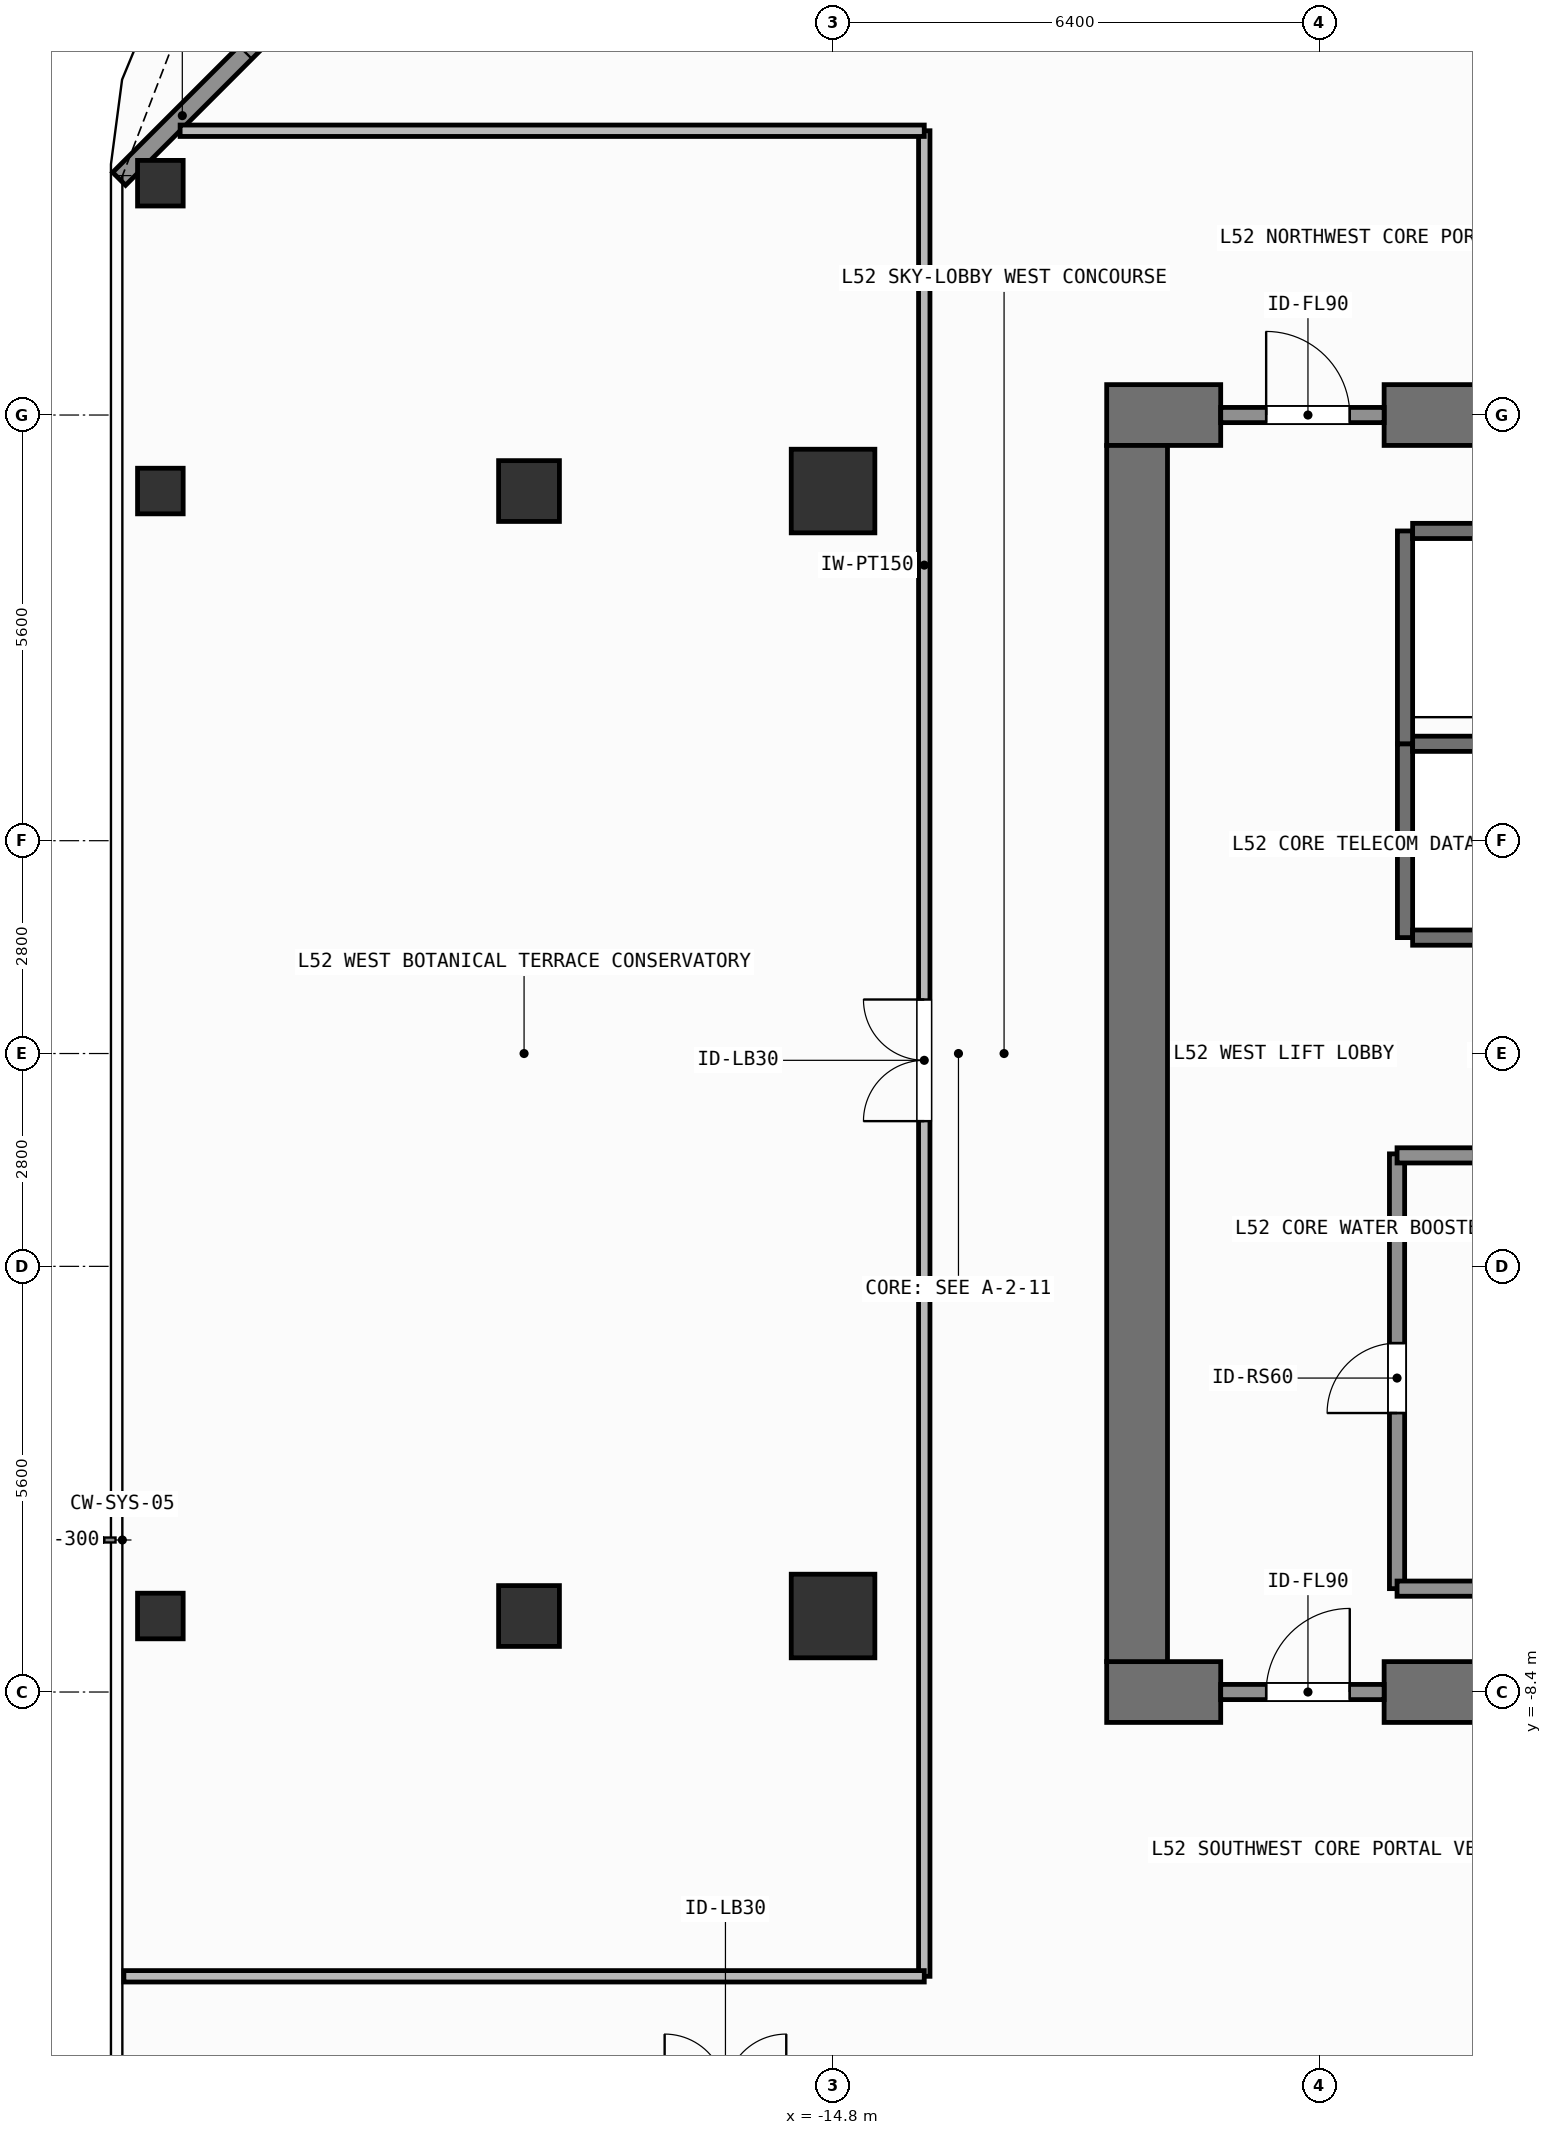
"""IFC4 building model, lengths in metres.
Left out: names, types, materials, properties, quantities, classifications, styles, units other than length and angle.
Written with IfcOpenShell. Run it as: python <this file> out.ifc"""

import sys

from ifc_helpers import new_model, si_unit, direction, frame, frame_2d, origin, origin_2d, place, context, subcontext, project, spatial, rectangle, hollow_rectangle, extrude, element, fill, save


model = new_model("IFC4")
c1 = context("Model", 3, precision=1e-05, world=origin(), true_north=direction((0.0, 1.0)))
c2 = subcontext(c1, "Body", "Model", "MODEL_VIEW")
j1 = project(units=[si_unit("LENGTHUNIT", "METRE"), si_unit("PLANEANGLEUNIT", "RADIAN")], contexts=[c1])
p1 = place(None, origin())
s1 = spatial("IfcSite", under=j1, at=p1, CompositionType="ELEMENT")
p2 = place(p1, origin())
s2 = spatial("IfcBuilding", under=s1, at=p2, CompositionType="ELEMENT")
p3 = place(p2, frame((0.0, 0.0, 210.9)))
s3 = spatial("IfcBuildingStorey", under=s2, at=p3, CompositionType="ELEMENT", Elevation=210.9)
p4 = place(p3, frame((-11.2, -8.4, 0.0), z_axis=(0.0, 0.0, 1.0), x_axis=(1.0, 0.0, 0.0)))
e1 = element("IfcWall", 1, at=p4, inside=s3, PredefinedType="SHEAR", context=c2, shape_type="SweptSolid", body=[
    extrude(rectangle(XDim=1.5, YDim=0.8, at=frame_2d((0.75, 0.0))), origin(), (0.0, 0.0, 1.0), 4.8),
])
p5 = place(p3, frame((-7.55, -8.4, 0.0), z_axis=(0.0, 0.0, 1.0), x_axis=(1.0, 0.0, 0.0)))
e2 = element("IfcWall", 2, at=p5, inside=s3, PredefinedType="SHEAR", context=c2, shape_type="SweptSolid", body=[
    extrude(rectangle(XDim=3.35, YDim=0.8, at=frame_2d((1.675, 0.0))), origin(), (0.0, 0.0, 1.0), 4.8),
])
p6 = place(p3, frame((-11.2, 8.4, 0.0), z_axis=(0.0, 0.0, 1.0), x_axis=(1.0, 0.0, 0.0)))
e3 = element("IfcWall", 3, at=p6, inside=s3, PredefinedType="SHEAR", context=c2, shape_type="SweptSolid", body=[
    extrude(rectangle(XDim=1.5, YDim=0.8, at=frame_2d((0.75, 0.0))), origin(), (0.0, 0.0, 1.0), 4.8),
])
p7 = place(p3, frame((-7.55, 8.4, 0.0), z_axis=(0.0, 0.0, 1.0), x_axis=(1.0, 0.0, 0.0)))
e4 = element("IfcWall", 4, at=p7, inside=s3, PredefinedType="SHEAR", context=c2, shape_type="SweptSolid", body=[
    extrude(rectangle(XDim=16.35, YDim=0.8, at=frame_2d((8.175, 0.0))), origin(), (0.0, 0.0, 1.0), 4.8),
])
p8 = place(p3, frame((-10.8, -8.0, 0.0), z_axis=(0.0, 0.0, 1.0), x_axis=(0.0, 1.0, 0.0)))
e5 = element("IfcWall", 5, at=p8, inside=s3, PredefinedType="SHEAR", context=c2, shape_type="SweptSolid", body=[
    extrude(rectangle(XDim=16.0, YDim=0.8, at=frame_2d((8.0, 0.0))), origin(), (0.0, 0.0, 1.0), 4.8),
])
for number, where, z_axis, x_axis in (
    (6, (-14.8, -7.4, 0.0), (0.0, 0.0, 1.0), (1.0, 0.0, 0.0)),
    (7, (-14.8, 7.4, 0.0), (0.0, 0.0, 1.0), (1.0, 0.0, 0.0)),
):
    element("IfcColumn", number, at=place(p3, frame(where, z_axis=z_axis, x_axis=x_axis)), inside=s3, PredefinedType="COLUMN", context=c2, shape_type="SweptSolid", body=[
        extrude(rectangle(XDim=1.1, YDim=1.1, at=origin_2d()), origin(), (0.0, 0.0, 1.0), 4.8),
    ])
for number, where, z_axis, x_axis in (
    (8, (-18.8, -7.4, 0.0), (0.0, 0.0, 1.0), (1.0, 0.0, 0.0)),
    (9, (-18.8, 7.4, 0.0), (0.0, 0.0, 1.0), (1.0, 0.0, 0.0)),
):
    element("IfcColumn", number, at=place(p3, frame(where, z_axis=z_axis, x_axis=x_axis)), inside=s3, PredefinedType="COLUMN", context=c2, shape_type="SweptSolid", body=[
        extrude(hollow_rectangle(XDim=0.8, YDim=0.8, WallThickness=0.036, at=origin_2d()), origin(), (0.0, 0.0, 1.0), 4.8),
    ])
for number, where, z_axis, x_axis in (
    (10, (-23.65, 11.45, 0.0), (0.0, 0.0, 1.0), (1.0, 0.0, 0.0)),
    (11, (-23.65, -7.4, 0.0), (0.0, 0.0, 1.0), (1.0, 0.0, 0.0)),
    (12, (-23.65, 7.4, 0.0), (0.0, 0.0, 1.0), (1.0, 0.0, 0.0)),
):
    element("IfcColumn", number, at=place(p3, frame(where, z_axis=z_axis, x_axis=x_axis)), inside=s3, PredefinedType="COLUMN", context=c2, shape_type="SweptSolid", body=[
        extrude(hollow_rectangle(XDim=0.6, YDim=0.6, WallThickness=0.028, at=origin_2d()), origin(), (0.0, 0.0, 1.0), 4.8),
    ])
p9 = place(p3, frame((-24.192, 11.508, 0.0), z_axis=(0.0, 0.0, 1.0), x_axis=(0.707106781187, 0.707106781187, 0.0)))
e13 = element("IfcWall", 13, at=p9, inside=s3, PredefinedType="SOLIDWALL", context=c2, shape_type="SweptSolid", body=[
    extrude(rectangle(XDim=6.201, YDim=0.24, at=frame_2d((3.101, 0.0))), origin(), (0.0, 0.0, 1.0), 4.58),
])
p10 = place(p9, frame((2.351, 0.0, 0.8)))
e14 = element("IfcOpeningElement", 14, at=p10, cuts=e13, PredefinedType="OPENING", context=c2, shape_type="SweptSolid", body=[
    extrude(rectangle(XDim=1.5, YDim=1.85, at=frame_2d((0.75, 0.925))), frame((0.0, 0.13, 0.0), z_axis=(0.0, -1.0, 0.0), x_axis=(1.0, 0.0, 0.0)), (0.0, 0.0, 1.0), 0.26),
])
p11 = place(p3, frame((-7.275, 1.525, 0.0), z_axis=(0.0, 0.0, 1.0), x_axis=(0.0, 1.0, 0.0)))
e15 = element("IfcWall", 15, at=p11, inside=s3, PredefinedType="SHEAR", context=c2, shape_type="SweptSolid", body=[
    extrude(rectangle(XDim=2.55, YDim=0.2, at=frame_2d((1.275, 0.0))), origin(), (0.0, 0.0, 1.0), 4.58),
])
for number, where, z_axis, x_axis in (
    (16, (-7.175, 1.525, 0.0), (0.0, 0.0, 1.0), (1.0, 0.0, 0.0)),
    (17, (-7.175, 4.075, 0.0), (0.0, 0.0, 1.0), (1.0, 0.0, 0.0)),
):
    element("IfcWall", number, at=place(p3, frame(where, z_axis=z_axis, x_axis=x_axis)), inside=s3, PredefinedType="SHEAR", context=c2, shape_type="SweptSolid", body=[
        extrude(rectangle(XDim=2.35, YDim=0.2, at=frame_2d((1.175, 0.0))), origin(), (0.0, 0.0, 1.0), 4.58),
    ])
p12 = place(p3, frame((-7.275, 4.075, 0.0), z_axis=(0.0, 0.0, 1.0), x_axis=(0.0, 1.0, 0.0)))
e18 = element("IfcWall", 18, at=p12, inside=s3, PredefinedType="SHEAR", context=c2, shape_type="SweptSolid", body=[
    extrude(rectangle(XDim=2.8, YDim=0.2, at=frame_2d((1.4, 0.0))), origin(), (0.0, 0.0, 1.0), 4.58),
])
p13 = place(p3, frame((-7.175, 6.875, 0.0), z_axis=(0.0, 0.0, 1.0), x_axis=(1.0, 0.0, 0.0)))
e19 = element("IfcWall", 19, at=p13, inside=s3, PredefinedType="SHEAR", context=c2, shape_type="SweptSolid", body=[
    extrude(rectangle(XDim=2.35, YDim=0.2, at=frame_2d((1.175, 0.0))), origin(), (0.0, 0.0, 1.0), 4.58),
])
p14 = place(p3, frame((-9.7, -8.4, 0.0), z_axis=(0.0, 0.0, 1.0), x_axis=(1.0, 0.0, 0.0)))
e20 = element("IfcWall", 20, at=p14, inside=s3, PredefinedType="SOLIDWALL", context=c2, shape_type="SweptSolid", body=[
    extrude(rectangle(XDim=2.15, YDim=0.2, at=frame_2d((1.075, 0.0))), origin(), (0.0, 0.0, 1.0), 3.72),
])
p15 = place(p14, frame((0.598, 0.0, 0.0)))
e21 = element("IfcOpeningElement", 21, at=p15, cuts=e20, PredefinedType="OPENING", context=c2, shape_type="SweptSolid", body=[
    extrude(rectangle(XDim=1.1, YDim=2.15, at=frame_2d((0.55, 1.075))), frame((0.0, 0.11, 0.0), z_axis=(0.0, -1.0, 0.0), x_axis=(1.0, 0.0, 0.0)), (0.0, 0.0, 1.0), 0.22),
])
p16 = place(p3, frame((-9.7, 8.4, 0.0), z_axis=(0.0, 0.0, 1.0), x_axis=(1.0, 0.0, 0.0)))
e22 = element("IfcWall", 22, at=p16, inside=s3, PredefinedType="SOLIDWALL", context=c2, shape_type="SweptSolid", body=[
    extrude(rectangle(XDim=2.15, YDim=0.2, at=frame_2d((1.075, 0.0))), origin(), (0.0, 0.0, 1.0), 3.72),
])
p17 = place(p16, frame((0.598, 0.0, 0.0)))
e23 = element("IfcOpeningElement", 23, at=p17, cuts=e22, PredefinedType="OPENING", context=c2, shape_type="SweptSolid", body=[
    extrude(rectangle(XDim=1.1, YDim=2.15, at=frame_2d((0.55, 1.075))), frame((0.0, 0.11, 0.0), z_axis=(0.0, -1.0, 0.0), x_axis=(1.0, 0.0, 0.0)), (0.0, 0.0, 1.0), 0.22),
])
p18 = place(p3, frame((-7.38, -7.04, 0.0), z_axis=(0.0, 0.0, 1.0), x_axis=(0.0, 1.0, 0.0)))
e24 = element("IfcWall", 24, at=p18, inside=s3, PredefinedType="SOLIDWALL", context=c2, shape_type="SweptSolid", body=[
    extrude(rectangle(XDim=5.72, YDim=0.2, at=frame_2d((2.86, 0.0))), origin(), (0.0, 0.0, 1.0), 4.58),
])
p19 = place(p18, frame((2.31, 0.0, 0.0)))
e25 = element("IfcOpeningElement", 25, at=p19, cuts=e24, PredefinedType="OPENING", context=c2, shape_type="SweptSolid", body=[
    extrude(rectangle(XDim=0.92, YDim=2.1, at=frame_2d((0.46, 1.05))), frame((0.0, 0.11, 0.0), z_axis=(0.0, -1.0, 0.0), x_axis=(1.0, 0.0, 0.0)), (0.0, 0.0, 1.0), 0.22),
])
p20 = place(p3, frame((-13.6, -12.14, 0.0), z_axis=(0.0, 0.0, 1.0), x_axis=(0.0, 1.0, 0.0)))
e26 = element("IfcWall", 26, at=p20, inside=s3, PredefinedType="PARTITIONING", context=c2, shape_type="SweptSolid", body=[
    extrude(rectangle(XDim=24.28, YDim=0.15, at=frame_2d((12.14, 0.0))), origin(), (0.0, 0.0, 1.0), 4.58),
])
p21 = place(p20, frame((11.25, 0.0, 0.0)))
e27 = element("IfcOpeningElement", 27, at=p21, cuts=e26, PredefinedType="OPENING", context=c2, shape_type="SweptSolid", body=[
    extrude(rectangle(XDim=1.6, YDim=2.3, at=frame_2d((0.8, 1.15))), frame((0.0, 0.085, 0.0), z_axis=(0.0, -1.0, 0.0), x_axis=(1.0, 0.0, 0.0)), (0.0, 0.0, 1.0), 0.17),
])
p22 = place(p3, frame((-7.38, -1.34, 0.0), z_axis=(0.0, 0.0, 1.0), x_axis=(1.0, 0.0, 0.0)))
e28 = element("IfcWall", 28, at=p22, inside=s3, PredefinedType="SOLIDWALL", context=c2, shape_type="SweptSolid", body=[
    extrude(rectangle(XDim=2.91, YDim=0.2, at=frame_2d((1.455, 0.0))), origin(), (0.0, 0.0, 1.0), 4.58),
])
p23 = place(p3, frame((-7.38, -7.04, 0.0), z_axis=(0.0, 0.0, 1.0), x_axis=(1.0, 0.0, 0.0)))
e29 = element("IfcWall", 29, at=p23, inside=s3, PredefinedType="SOLIDWALL", context=c2, shape_type="SweptSolid", body=[
    extrude(rectangle(XDim=2.8, YDim=0.2, at=frame_2d((1.4, 0.0))), origin(), (0.0, 0.0, 1.0), 4.58),
])
p24 = place(p3, frame((-24.13, -12.14, 0.0), z_axis=(0.0, 0.0, 1.0), x_axis=(1.0, 0.0, 0.0)))
e30 = element("IfcWall", 30, at=p24, inside=s3, PredefinedType="PARTITIONING", context=c2, shape_type="SweptSolid", body=[
    extrude(rectangle(XDim=10.53, YDim=0.15, at=frame_2d((5.265, 0.0))), origin(), (0.0, 0.0, 1.0), 4.58),
])
p25 = place(p3, frame((-23.39, 12.14, 0.0), z_axis=(0.0, 0.0, 1.0), x_axis=(1.0, 0.0, 0.0)))
e31 = element("IfcWall", 31, at=p25, inside=s3, PredefinedType="PARTITIONING", context=c2, shape_type="SweptSolid", body=[
    extrude(rectangle(XDim=9.79, YDim=0.15, at=frame_2d((4.895, 0.0))), origin(), (0.0, 0.0, 1.0), 4.58),
])
p26 = place(p10, origin())
e32 = element("IfcWindow", 32, at=p26, inside=s3, PartitioningType="SINGLE_PANEL", PredefinedType="WINDOW", context=c2, shape_type="SweptSolid", body=[
    extrude(rectangle(XDim=1.5, YDim=1.85, at=frame_2d((0.75, 0.925))), frame((0.0, 0.03, 0.0), z_axis=(0.0, -1.0, 0.0), x_axis=(1.0, 0.0, 0.0)), (0.0, 0.0, 1.0), 0.06),
])
fill(e14, e32)
p27 = place(p15, origin())
e33 = element("IfcDoor", 33, at=p27, inside=s3, OperationType="SINGLE_SWING_RIGHT", PredefinedType="DOOR", context=c2, shape_type="SweptSolid", body=[
    extrude(rectangle(XDim=1.1, YDim=2.15, at=frame_2d((0.55, 1.075))), frame((0.0, 0.025, 0.0), z_axis=(0.0, -1.0, 0.0), x_axis=(1.0, 0.0, 0.0)), (0.0, 0.0, 1.0), 0.05),
])
fill(e21, e33)
p28 = place(p17, origin())
e34 = element("IfcDoor", 34, at=p28, inside=s3, OperationType="SINGLE_SWING_LEFT", PredefinedType="DOOR", context=c2, shape_type="SweptSolid", body=[
    extrude(rectangle(XDim=1.1, YDim=2.15, at=frame_2d((0.55, 1.075))), frame((0.0, 0.025, 0.0), z_axis=(0.0, -1.0, 0.0), x_axis=(1.0, 0.0, 0.0)), (0.0, 0.0, 1.0), 0.05),
])
fill(e23, e34)
p29 = place(p19, origin())
e35 = element("IfcDoor", 35, at=p29, inside=s3, OperationType="SINGLE_SWING_LEFT", PredefinedType="DOOR", context=c2, shape_type="SweptSolid", body=[
    extrude(rectangle(XDim=0.92, YDim=2.1, at=frame_2d((0.46, 1.05))), frame((0.0, 0.025, 0.0), z_axis=(0.0, -1.0, 0.0), x_axis=(1.0, 0.0, 0.0)), (0.0, 0.0, 1.0), 0.05),
])
fill(e25, e35)
p30 = place(p21, origin())
e36 = element("IfcDoor", 36, at=p30, inside=s3, OperationType="SINGLE_SWING_LEFT", PredefinedType="DOOR", context=c2, shape_type="SweptSolid", body=[
    extrude(rectangle(XDim=1.6, YDim=2.3, at=frame_2d((0.8, 1.15))), frame((0.0, 0.025, 0.0), z_axis=(0.0, -1.0, 0.0), x_axis=(1.0, 0.0, 0.0)), (0.0, 0.0, 1.0), 0.05),
])
fill(e27, e36)
save(model, sys.argv[1])
